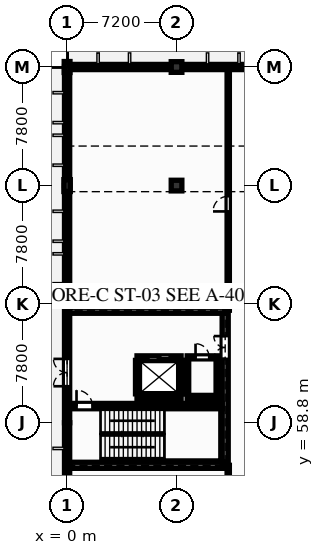
"""IFC4 building model, lengths in metres.
Left out: names, types, materials, properties, quantities, classifications, styles, units other than length and angle.
Written with IfcOpenShell. Run it as: python <this file> out.ifc"""

import sys

from ifc_helpers import new_model, si_unit, direction, frame, frame_2d, origin, origin_2d, place, context, subcontext, project, spatial, rectangle, extrude, element, fill, save


model = new_model("IFC4")
c1 = context("Model", 3, precision=1e-05, world=origin(), true_north=direction((0.0, 1.0)))
c2 = subcontext(c1, "Body", "Model", "MODEL_VIEW")
j1 = project(units=[si_unit("LENGTHUNIT", "METRE"), si_unit("PLANEANGLEUNIT", "RADIAN")], contexts=[c1])
p1 = place(None, origin())
s1 = spatial("IfcSite", under=j1, at=p1, CompositionType="ELEMENT")
p2 = place(p1, origin())
s2 = spatial("IfcBuilding", under=s1, at=p2, CompositionType="ELEMENT")
p3 = place(p2, origin())
s3 = spatial("IfcBuildingStorey", under=s2, at=p3, CompositionType="ELEMENT", Elevation=0.0)
p4 = place(p3, frame((0.0, 74.4, 0.0), z_axis=(0.0, 0.0, 1.0), x_axis=(1.0, 0.0, 0.0)))
e1 = element("IfcColumn", 1, at=p4, inside=s3, PredefinedType="PILASTER", context=c2, shape_type="SweptSolid", body=[
    extrude(rectangle(XDim=0.42, YDim=0.78, at=origin_2d()), origin(), (0.0, 0.0, 1.0), 5.1),
])
p5 = place(p3, frame((0.0, 82.2, 0.0), z_axis=(0.0, 0.0, 1.0), x_axis=(1.0, 0.0, 0.0)))
e2 = element("IfcColumn", 2, at=p5, inside=s3, PredefinedType="PILASTER", context=c2, shape_type="SweptSolid", body=[
    extrude(rectangle(XDim=0.38, YDim=0.72, at=origin_2d()), origin(), (0.0, 0.0, 1.0), 5.1),
])
for number, where, z_axis, x_axis in (
    (3, (7.2, 74.4, 0.0), (0.0, 0.0, 1.0), (1.0, 0.0, 0.0)),
    (4, (7.2, 82.2, 0.0), (0.0, 0.0, 1.0), (1.0, 0.0, 0.0)),
):
    element("IfcColumn", number, at=place(p3, frame(where, z_axis=z_axis, x_axis=x_axis)), inside=s3, PredefinedType="COLUMN", context=c2, shape_type="SweptSolid", body=[
        extrude(rectangle(XDim=0.7, YDim=0.7, at=origin_2d()), origin(), (0.0, 0.0, 1.0), 5.1),
    ])
p6 = place(p3, frame((0.0, 51.0, 0.0), z_axis=(0.0, 0.0, 1.0), x_axis=(0.0, 1.0, 0.0)))
e5 = element("IfcWall", 5, at=p6, inside=s3, PredefinedType="SOLIDWALL", context=c2, shape_type="SweptSolid", body=[
    extrude(rectangle(XDim=7.8, YDim=0.34, at=frame_2d((3.9, 0.0))), origin(), (0.0, 0.0, 1.0), 4.8),
])
p7 = place(p6, frame((1.5, 0.0, 0.85)))
e6 = element("IfcOpeningElement", 6, at=p7, cuts=e5, PredefinedType="OPENING", context=c2, shape_type="SweptSolid", body=[
    extrude(rectangle(XDim=1.65, YDim=2.25, at=frame_2d((0.825, 1.125))), frame((0.0, 0.18, 0.0), z_axis=(0.0, -1.0, 0.0), x_axis=(1.0, 0.0, 0.0)), (0.0, 0.0, 1.0), 0.36),
])
p8 = place(p3, frame((0.0, 58.8, 0.0), z_axis=(0.0, 0.0, 1.0), x_axis=(0.0, 1.0, 0.0)))
e7 = element("IfcWall", 7, at=p8, inside=s3, PredefinedType="SOLIDWALL", context=c2, shape_type="SweptSolid", body=[
    extrude(rectangle(XDim=7.8, YDim=0.34, at=frame_2d((3.9, 0.0))), origin(), (0.0, 0.0, 1.0), 4.8),
])
p9 = place(p8, frame((2.4, 0.0, 0.0)))
e8 = element("IfcOpeningElement", 8, at=p9, cuts=e7, PredefinedType="OPENING", context=c2, shape_type="SweptSolid", body=[
    extrude(rectangle(XDim=1.8, YDim=2.4, at=frame_2d((0.9, 1.2))), frame((0.0, 0.18, 0.0), z_axis=(0.0, -1.0, 0.0), x_axis=(1.0, 0.0, 0.0)), (0.0, 0.0, 1.0), 0.36),
])
p10 = place(p3, frame((0.0, 66.6, 0.0), z_axis=(0.0, 0.0, 1.0), x_axis=(0.0, 1.0, 0.0)))
e9 = element("IfcWall", 9, at=p10, inside=s3, PredefinedType="SOLIDWALL", context=c2, shape_type="SweptSolid", body=[
    extrude(rectangle(XDim=7.8, YDim=0.34, at=frame_2d((3.9, 0.0))), origin(), (0.0, 0.0, 1.0), 4.8),
])
p11 = place(p10, frame((1.5, 0.0, 0.85)))
e10 = element("IfcOpeningElement", 10, at=p11, cuts=e9, PredefinedType="OPENING", context=c2, shape_type="SweptSolid", body=[
    extrude(rectangle(XDim=1.65, YDim=2.25, at=frame_2d((0.825, 1.125))), frame((0.0, 0.18, 0.0), z_axis=(0.0, -1.0, 0.0), x_axis=(1.0, 0.0, 0.0)), (0.0, 0.0, 1.0), 0.36),
])
p12 = place(p10, frame((4.3, 0.0, 0.85)))
e11 = element("IfcOpeningElement", 11, at=p12, cuts=e9, PredefinedType="OPENING", context=c2, shape_type="SweptSolid", body=[
    extrude(rectangle(XDim=1.65, YDim=2.25, at=frame_2d((0.825, 1.125))), frame((0.0, 0.18, 0.0), z_axis=(0.0, -1.0, 0.0), x_axis=(1.0, 0.0, 0.0)), (0.0, 0.0, 1.0), 0.36),
])
p13 = place(p3, frame((0.0, 74.4, 0.0), z_axis=(0.0, 0.0, 1.0), x_axis=(0.0, 1.0, 0.0)))
e12 = element("IfcWall", 12, at=p13, inside=s3, PredefinedType="SOLIDWALL", context=c2, shape_type="SweptSolid", body=[
    extrude(rectangle(XDim=7.8, YDim=0.34, at=frame_2d((3.9, 0.0))), origin(), (0.0, 0.0, 1.0), 4.8),
])
p14 = place(p13, frame((1.5, 0.0, 0.85)))
e13 = element("IfcOpeningElement", 13, at=p14, cuts=e12, PredefinedType="OPENING", context=c2, shape_type="SweptSolid", body=[
    extrude(rectangle(XDim=1.65, YDim=2.25, at=frame_2d((0.825, 1.125))), frame((0.0, 0.18, 0.0), z_axis=(0.0, -1.0, 0.0), x_axis=(1.0, 0.0, 0.0)), (0.0, 0.0, 1.0), 0.36),
])
p15 = place(p13, frame((4.3, 0.0, 0.85)))
e14 = element("IfcOpeningElement", 14, at=p15, cuts=e12, PredefinedType="OPENING", context=c2, shape_type="SweptSolid", body=[
    extrude(rectangle(XDim=1.65, YDim=2.25, at=frame_2d((0.825, 1.125))), frame((0.0, 0.18, 0.0), z_axis=(0.0, -1.0, 0.0), x_axis=(1.0, 0.0, 0.0)), (0.0, 0.0, 1.0), 0.36),
])
p16 = place(p3, frame((0.0, 82.2, 0.0), z_axis=(0.0, 0.0, 1.0), x_axis=(1.0, 0.0, 0.0)))
e15 = element("IfcWall", 15, at=p16, inside=s3, PredefinedType="SOLIDWALL", context=c2, shape_type="SweptSolid", body=[
    extrude(rectangle(XDim=7.2, YDim=0.34, at=frame_2d((3.6, 0.0))), origin(), (0.0, 0.0, 1.0), 4.8),
])
p17 = place(p16, frame((2.2, 0.0, 0.9)))
e16 = element("IfcOpeningElement", 16, at=p17, cuts=e15, PredefinedType="OPENING", context=c2, shape_type="SweptSolid", body=[
    extrude(rectangle(XDim=1.75, YDim=2.15, at=frame_2d((0.875, 1.075))), frame((0.0, 0.18, 0.0), z_axis=(0.0, -1.0, 0.0), x_axis=(1.0, 0.0, 0.0)), (0.0, 0.0, 1.0), 0.36),
])
p18 = place(p3, frame((7.2, 82.2, 0.0), z_axis=(0.0, 0.0, 1.0), x_axis=(1.0, 0.0, 0.0)))
e17 = element("IfcWall", 17, at=p18, inside=s3, PredefinedType="SOLIDWALL", context=c2, shape_type="SweptSolid", body=[
    extrude(rectangle(XDim=7.2, YDim=0.34, at=frame_2d((3.6, 0.0))), origin(), (0.0, 0.0, 1.0), 4.8),
])
p19 = place(p18, frame((4.4, 0.0, 0.9)))
e18 = element("IfcOpeningElement", 18, at=p19, cuts=e17, PredefinedType="OPENING", context=c2, shape_type="SweptSolid", body=[
    extrude(rectangle(XDim=1.75, YDim=2.15, at=frame_2d((0.875, 1.075))), frame((0.0, 0.18, 0.0), z_axis=(0.0, -1.0, 0.0), x_axis=(1.0, 0.0, 0.0)), (0.0, 0.0, 1.0), 0.36),
])
for number, where, z_axis, x_axis in (
    (19, (0.17, 56.0, 0.0), (0.0, 0.0, 1.0), (1.0, 0.0, 0.0)),
    (20, (0.17, 66.2, 0.0), (0.0, 0.0, 1.0), (1.0, 0.0, 0.0)),
):
    element("IfcWall", number, at=place(p3, frame(where, z_axis=z_axis, x_axis=x_axis)), inside=s3, PredefinedType="SHEAR", context=c2, shape_type="SweptSolid", body=[
        extrude(rectangle(XDim=10.23, YDim=0.4, at=frame_2d((5.115, 0.0))), origin(), (0.0, 0.0, 1.0), 4.8),
    ])
p20 = place(p3, frame((10.4, 56.2, 0.0), z_axis=(0.0, 0.0, 1.0), x_axis=(0.0, 1.0, 0.0)))
e21 = element("IfcWall", 21, at=p20, inside=s3, PredefinedType="SHEAR", context=c2, shape_type="SweptSolid", body=[
    extrude(rectangle(XDim=9.8, YDim=0.4, at=frame_2d((4.9, 0.0))), origin(), (0.0, 0.0, 1.0), 4.8),
])
p21 = place(p20, frame((6.8, 0.0, 0.0)))
e22 = element("IfcOpeningElement", 22, at=p21, cuts=e21, PredefinedType="OPENING", context=c2, shape_type="SweptSolid", body=[
    extrude(rectangle(XDim=1.5, YDim=2.2, at=frame_2d((0.75, 1.1))), frame((0.0, 0.21, 0.0), z_axis=(0.0, -1.0, 0.0), x_axis=(1.0, 0.0, 0.0)), (0.0, 0.0, 1.0), 0.42),
])
p22 = place(p3, frame((0.17, 59.895, 0.0), z_axis=(0.0, 0.0, 1.0), x_axis=(1.0, 0.0, 0.0)))
e23 = element("IfcWall", 23, at=p22, inside=s3, PredefinedType="SHEAR", context=c2, shape_type="SweptSolid", body=[
    extrude(rectangle(XDim=10.03, YDim=0.35, at=frame_2d((5.015, 0.0))), origin(), (0.0, 0.0, 1.0), 4.8),
])
p23 = place(p22, frame((0.45, 0.0, 0.0)))
e24 = element("IfcOpeningElement", 24, at=p23, cuts=e23, PredefinedType="OPENING", context=c2, shape_type="SweptSolid", body=[
    extrude(rectangle(XDim=1.05, YDim=2.2, at=frame_2d((0.525, 1.1))), frame((0.0, 0.185, 0.0), z_axis=(0.0, -1.0, 0.0), x_axis=(1.0, 0.0, 0.0)), (0.0, 0.0, 1.0), 0.37),
])
p24 = place(p3, frame((4.6, 60.5, 0.0), z_axis=(0.0, 0.0, 1.0), x_axis=(1.0, 0.0, 0.0)))
e25 = element("IfcWall", 25, at=p24, inside=s3, PredefinedType="PARTITIONING", context=c2, shape_type="SweptSolid", body=[
    extrude(rectangle(XDim=2.9, YDim=0.2, at=frame_2d((1.45, 0.0))), origin(), (0.0, 0.0, 1.0), 4.8),
])
p25 = place(p3, frame((4.6, 63.1, 0.0), z_axis=(0.0, 0.0, 1.0), x_axis=(1.0, 0.0, 0.0)))
e26 = element("IfcWall", 26, at=p25, inside=s3, PredefinedType="PARTITIONING", context=c2, shape_type="SweptSolid", body=[
    extrude(rectangle(XDim=2.9, YDim=0.2, at=frame_2d((1.45, 0.0))), origin(), (0.0, 0.0, 1.0), 4.8),
])
p26 = place(p25, frame((0.75, 0.0, 0.0)))
e27 = element("IfcOpeningElement", 27, at=p26, cuts=e26, PredefinedType="OPENING", context=c2, shape_type="SweptSolid", body=[
    extrude(rectangle(XDim=1.4, YDim=2.25, at=frame_2d((0.7, 1.125))), frame((0.0, 0.11, 0.0), z_axis=(0.0, -1.0, 0.0), x_axis=(1.0, 0.0, 0.0)), (0.0, 0.0, 1.0), 0.22),
])
for number, where, z_axis, x_axis in (
    (28, (4.6, 60.7, 0.0), (0.0, 0.0, 1.0), (0.0, 1.0, 0.0)),
    (29, (7.5, 60.7, 0.0), (0.0, 0.0, 1.0), (0.0, 1.0, 0.0)),
):
    element("IfcWall", number, at=place(p3, frame(where, z_axis=z_axis, x_axis=x_axis)), inside=s3, PredefinedType="PARTITIONING", context=c2, shape_type="SweptSolid", body=[
        extrude(rectangle(XDim=2.2, YDim=0.2, at=frame_2d((1.1, 0.0))), origin(), (0.0, 0.0, 1.0), 4.8),
    ])
p27 = place(p3, frame((7.9, 60.5, 0.0), z_axis=(0.0, 0.0, 1.0), x_axis=(1.0, 0.0, 0.0)))
e30 = element("IfcWall", 30, at=p27, inside=s3, PredefinedType="PARTITIONING", context=c2, shape_type="SweptSolid", body=[
    extrude(rectangle(XDim=2.0, YDim=0.2, at=frame_2d((1.0, 0.0))), origin(), (0.0, 0.0, 1.0), 4.8),
])
p28 = place(p3, frame((7.9, 63.1, 0.0), z_axis=(0.0, 0.0, 1.0), x_axis=(1.0, 0.0, 0.0)))
e31 = element("IfcWall", 31, at=p28, inside=s3, PredefinedType="PARTITIONING", context=c2, shape_type="SweptSolid", body=[
    extrude(rectangle(XDim=2.0, YDim=0.2, at=frame_2d((1.0, 0.0))), origin(), (0.0, 0.0, 1.0), 4.8),
])
p29 = place(p28, frame((0.55, 0.0, 0.0)))
e32 = element("IfcOpeningElement", 32, at=p29, cuts=e31, PredefinedType="OPENING", context=c2, shape_type="SweptSolid", body=[
    extrude(rectangle(XDim=0.9, YDim=2.1, at=frame_2d((0.45, 1.05))), frame((0.0, 0.11, 0.0), z_axis=(0.0, -1.0, 0.0), x_axis=(1.0, 0.0, 0.0)), (0.0, 0.0, 1.0), 0.22),
])
for number, where, z_axis, x_axis in (
    (33, (7.9, 60.7, 0.0), (0.0, 0.0, 1.0), (0.0, 1.0, 0.0)),
    (34, (9.9, 60.7, 0.0), (0.0, 0.0, 1.0), (0.0, 1.0, 0.0)),
):
    element("IfcWall", number, at=place(p3, frame(where, z_axis=z_axis, x_axis=x_axis)), inside=s3, PredefinedType="PARTITIONING", context=c2, shape_type="SweptSolid", body=[
        extrude(rectangle(XDim=2.2, YDim=0.2, at=frame_2d((1.1, 0.0))), origin(), (0.0, 0.0, 1.0), 4.8),
    ])
p30 = place(p3, frame((10.6, 28.8, 0.0), z_axis=(0.0, 0.0, 1.0), x_axis=(0.0, 1.0, 0.0)))
e35 = element("IfcWall", 35, at=p30, inside=s3, PredefinedType="PARTITIONING", context=c2, shape_type="SweptSolid", body=[
    extrude(rectangle(XDim=27.2, YDim=0.15, at=frame_2d((13.6, 0.0))), origin(), (0.0, 0.0, 1.0), 4.459),
])
p31 = place(p30, frame((11.0, 0.0, 0.0)))
e36 = element("IfcOpeningElement", 36, at=p31, cuts=e35, PredefinedType="OPENING", context=c2, shape_type="SweptSolid", body=[
    extrude(rectangle(XDim=1.0, YDim=2.15, at=frame_2d((0.5, 1.075))), frame((0.0, 0.085, 0.0), z_axis=(0.0, -1.0, 0.0), x_axis=(1.0, 0.0, 0.0)), (0.0, 0.0, 1.0), 0.17),
])
p32 = place(p3, frame((10.6, 66.2, 0.0), z_axis=(0.0, 0.0, 1.0), x_axis=(0.0, 1.0, 0.0)))
e37 = element("IfcWall", 37, at=p32, inside=s3, PredefinedType="PARTITIONING", context=c2, shape_type="SweptSolid", body=[
    extrude(rectangle(XDim=16.0, YDim=0.15, at=frame_2d((8.0, 0.0))), origin(), (0.0, 0.0, 1.0), 4.8),
])
p33 = place(p32, frame((6.5, 0.0, 0.0)))
e38 = element("IfcOpeningElement", 38, at=p33, cuts=e37, PredefinedType="OPENING", context=c2, shape_type="SweptSolid", body=[
    extrude(rectangle(XDim=1.0, YDim=2.15, at=frame_2d((0.5, 1.075))), frame((0.0, 0.085, 0.0), z_axis=(0.0, -1.0, 0.0), x_axis=(1.0, 0.0, 0.0)), (0.0, 0.0, 1.0), 0.17),
])
p34 = place(p9, origin())
e39 = element("IfcDoor", 39, at=p34, inside=s3, OperationType="DOUBLE_DOOR_SINGLE_SWING", PredefinedType="DOOR", context=c2, shape_type="SweptSolid", body=[
    extrude(rectangle(XDim=1.8, YDim=2.4, at=frame_2d((0.9, 1.2))), frame((0.0, 0.025, 0.0), z_axis=(0.0, -1.0, 0.0), x_axis=(1.0, 0.0, 0.0)), (0.0, 0.0, 1.0), 0.05),
])
fill(e8, e39)
p35 = place(p11, origin())
e40 = element("IfcWindow", 40, at=p35, inside=s3, PartitioningType="SINGLE_PANEL", PredefinedType="WINDOW", context=c2, shape_type="SweptSolid", body=[
    extrude(rectangle(XDim=1.65, YDim=2.25, at=frame_2d((0.825, 1.125))), frame((0.0, 0.03, 0.0), z_axis=(0.0, -1.0, 0.0), x_axis=(1.0, 0.0, 0.0)), (0.0, 0.0, 1.0), 0.06),
])
fill(e10, e40)
p36 = place(p12, origin())
e41 = element("IfcWindow", 41, at=p36, inside=s3, PartitioningType="SINGLE_PANEL", PredefinedType="WINDOW", context=c2, shape_type="SweptSolid", body=[
    extrude(rectangle(XDim=1.65, YDim=2.25, at=frame_2d((0.825, 1.125))), frame((0.0, 0.03, 0.0), z_axis=(0.0, -1.0, 0.0), x_axis=(1.0, 0.0, 0.0)), (0.0, 0.0, 1.0), 0.06),
])
fill(e11, e41)
p37 = place(p14, origin())
e42 = element("IfcWindow", 42, at=p37, inside=s3, PartitioningType="SINGLE_PANEL", PredefinedType="WINDOW", context=c2, shape_type="SweptSolid", body=[
    extrude(rectangle(XDim=1.65, YDim=2.25, at=frame_2d((0.825, 1.125))), frame((0.0, 0.03, 0.0), z_axis=(0.0, -1.0, 0.0), x_axis=(1.0, 0.0, 0.0)), (0.0, 0.0, 1.0), 0.06),
])
fill(e13, e42)
p38 = place(p15, origin())
e43 = element("IfcWindow", 43, at=p38, inside=s3, PartitioningType="SINGLE_PANEL", PredefinedType="WINDOW", context=c2, shape_type="SweptSolid", body=[
    extrude(rectangle(XDim=1.65, YDim=2.25, at=frame_2d((0.825, 1.125))), frame((0.0, 0.03, 0.0), z_axis=(0.0, -1.0, 0.0), x_axis=(1.0, 0.0, 0.0)), (0.0, 0.0, 1.0), 0.06),
])
fill(e14, e43)
p39 = place(p17, origin())
e44 = element("IfcWindow", 44, at=p39, inside=s3, PartitioningType="SINGLE_PANEL", PredefinedType="WINDOW", context=c2, shape_type="SweptSolid", body=[
    extrude(rectangle(XDim=1.75, YDim=2.15, at=frame_2d((0.875, 1.075))), frame((0.0, 0.03, 0.0), z_axis=(0.0, -1.0, 0.0), x_axis=(1.0, 0.0, 0.0)), (0.0, 0.0, 1.0), 0.06),
])
fill(e16, e44)
p40 = place(p19, origin())
e45 = element("IfcWindow", 45, at=p40, inside=s3, PartitioningType="SINGLE_PANEL", PredefinedType="WINDOW", context=c2, shape_type="SweptSolid", body=[
    extrude(rectangle(XDim=1.75, YDim=2.15, at=frame_2d((0.875, 1.075))), frame((0.0, 0.03, 0.0), z_axis=(0.0, -1.0, 0.0), x_axis=(1.0, 0.0, 0.0)), (0.0, 0.0, 1.0), 0.06),
])
fill(e18, e45)
p41 = place(p21, origin())
e46 = element("IfcDoor", 46, at=p41, inside=s3, OperationType="DOUBLE_DOOR_SINGLE_SWING", PredefinedType="DOOR", context=c2, shape_type="SweptSolid", body=[
    extrude(rectangle(XDim=1.5, YDim=2.2, at=frame_2d((0.75, 1.1))), frame((0.0, 0.025, 0.0), z_axis=(0.0, -1.0, 0.0), x_axis=(1.0, 0.0, 0.0)), (0.0, 0.0, 1.0), 0.05),
])
fill(e22, e46)
p42 = place(p23, origin())
e47 = element("IfcDoor", 47, at=p42, inside=s3, OperationType="SINGLE_SWING_LEFT", PredefinedType="DOOR", context=c2, shape_type="SweptSolid", body=[
    extrude(rectangle(XDim=1.05, YDim=2.2, at=frame_2d((0.525, 1.1))), frame((0.0, 0.025, 0.0), z_axis=(0.0, -1.0, 0.0), x_axis=(1.0, 0.0, 0.0)), (0.0, 0.0, 1.0), 0.05),
])
fill(e24, e47)
p43 = place(p26, origin())
e48 = element("IfcDoor", 48, at=p43, inside=s3, OperationType="SLIDING_TO_LEFT", PredefinedType="DOOR", context=c2, shape_type="SweptSolid", body=[
    extrude(rectangle(XDim=1.4, YDim=2.25, at=frame_2d((0.7, 1.125))), frame((0.0, 0.025, 0.0), z_axis=(0.0, -1.0, 0.0), x_axis=(1.0, 0.0, 0.0)), (0.0, 0.0, 1.0), 0.05),
])
fill(e27, e48)
p44 = place(p29, origin())
e49 = element("IfcDoor", 49, at=p44, inside=s3, OperationType="SINGLE_SWING_LEFT", PredefinedType="DOOR", context=c2, shape_type="SweptSolid", body=[
    extrude(rectangle(XDim=0.9, YDim=2.1, at=frame_2d((0.45, 1.05))), frame((0.0, 0.025, 0.0), z_axis=(0.0, -1.0, 0.0), x_axis=(1.0, 0.0, 0.0)), (0.0, 0.0, 1.0), 0.05),
])
fill(e32, e49)
p45 = place(p33, origin())
e50 = element("IfcDoor", 50, at=p45, inside=s3, OperationType="SINGLE_SWING_LEFT", PredefinedType="DOOR", context=c2, shape_type="SweptSolid", body=[
    extrude(rectangle(XDim=1.0, YDim=2.15, at=frame_2d((0.5, 1.075))), frame((0.0, 0.025, 0.0), z_axis=(0.0, -1.0, 0.0), x_axis=(1.0, 0.0, 0.0)), (0.0, 0.0, 1.0), 0.05),
])
fill(e38, e50)
save(model, sys.argv[1])
